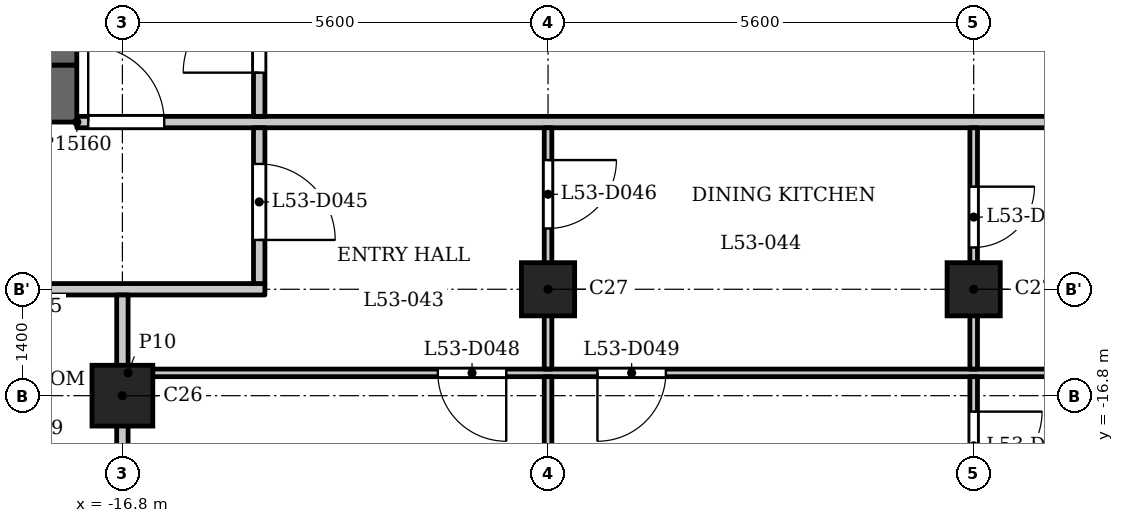
"""IFC4 building model, lengths in metres.
Left out: names, types, materials, properties, quantities, classifications, styles, units other than length and angle.
Written with IfcOpenShell. Run it as: python <this file> out.ifc"""

import sys

from ifc_helpers import new_model, si_unit, direction, frame, frame_2d, origin, origin_2d, place, context, subcontext, project, spatial, rectangle, extrude, element, fill, save


model = new_model("IFC4")
c1 = context("Model", 3, precision=1e-05, world=origin(), true_north=direction((0.0, 1.0)))
c2 = subcontext(c1, "Body", "Model", "MODEL_VIEW")
j1 = project(units=[si_unit("LENGTHUNIT", "METRE"), si_unit("PLANEANGLEUNIT", "RADIAN")], contexts=[c1])
p1 = place(None, origin())
s1 = spatial("IfcSite", under=j1, at=p1, CompositionType="ELEMENT")
p2 = place(p1, origin())
s2 = spatial("IfcBuilding", under=s1, at=p2, CompositionType="ELEMENT")
p3 = place(p2, frame((0.0, 0.0, 206.4)))
s3 = spatial("IfcBuildingStorey", under=s2, at=p3, CompositionType="ELEMENT", Elevation=206.4)
p4 = place(p3, frame((-16.8, -16.8, 0.0), z_axis=(0.0, 0.0, 1.0), x_axis=(1.0, 0.0, 0.0)))
e1 = element("IfcColumn", 1, at=p4, inside=s3, PredefinedType="COLUMN", context=c2, shape_type="SweptSolid", body=[
    extrude(rectangle(XDim=0.8, YDim=0.8, at=origin_2d()), origin(), (0.0, 0.0, 1.0), 3.5),
])
for number, where, z_axis, x_axis in (
    (2, (-11.2, -15.4, 0.0), (0.0, 0.0, 1.0), (1.0, 0.0, 0.0)),
    (3, (-5.6, -15.4, 0.0), (0.0, 0.0, 1.0), (1.0, 0.0, 0.0)),
):
    element("IfcColumn", number, at=place(p3, frame(where, z_axis=z_axis, x_axis=x_axis)), inside=s3, PredefinedType="COLUMN", context=c2, shape_type="SweptSolid", body=[
        extrude(rectangle(XDim=0.7, YDim=0.7, at=origin_2d()), origin(), (0.0, 0.0, 1.0), 3.5),
    ])
p5 = place(p3, frame((-17.4, -12.825, 0.0), z_axis=(0.0, 0.0, 1.0), x_axis=(-1.0, 0.0, 0.0)))
e4 = element("IfcWall", 4, at=p5, inside=s3, PredefinedType="SHEAR", context=c2, shape_type="SweptSolid", body=[
    extrude(rectangle(XDim=7.6, YDim=0.75, at=frame_2d((3.8, 0.0))), origin(), (0.0, 0.0, 1.0), 3.2),
])
p6 = place(p3, frame((-17.6, -12.45, 0.0), z_axis=(0.0, 0.0, 1.0), x_axis=(0.0, 1.0, 0.0)))
e5 = element("IfcWall", 5, at=p6, inside=s3, PredefinedType="SHEAR", context=c2, shape_type="SweptSolid", body=[
    extrude(rectangle(XDim=24.9, YDim=0.4, at=frame_2d((12.45, 0.0))), origin(), (0.0, 0.0, 1.0), 3.2),
])
p7 = place(p6, frame((8.65, 0.0, 0.0)))
e6 = element("IfcOpeningElement", 6, at=p7, cuts=e5, PredefinedType="OPENING", context=c2, shape_type="SweptSolid", body=[
    extrude(rectangle(XDim=0.9, YDim=2.1, at=frame_2d((0.45, 1.05))), frame((0.0, 0.21, 0.0), z_axis=(0.0, -1.0, 0.0), x_axis=(1.0, 0.0, 0.0)), (0.0, 0.0, 1.0), 0.42),
])
p8 = place(p6, frame((15.6, 0.0, 0.0)))
e7 = element("IfcOpeningElement", 7, at=p8, cuts=e5, PredefinedType="OPENING", context=c2, shape_type="SweptSolid", body=[
    extrude(rectangle(XDim=1.1, YDim=2.1, at=frame_2d((0.55, 1.05))), frame((0.0, 0.21, 0.0), z_axis=(0.0, -1.0, 0.0), x_axis=(1.0, 0.0, 0.0)), (0.0, 0.0, 1.0), 0.42),
])
p9 = place(p6, frame((18.0, 0.0, 0.0)))
e8 = element("IfcOpeningElement", 8, at=p9, cuts=e5, PredefinedType="OPENING", context=c2, shape_type="SweptSolid", body=[
    extrude(rectangle(XDim=1.1, YDim=2.1, at=frame_2d((0.55, 1.05))), frame((0.0, 0.21, 0.0), z_axis=(0.0, -1.0, 0.0), x_axis=(1.0, 0.0, 0.0)), (0.0, 0.0, 1.0), 0.42),
])
p10 = place(p6, frame((23.025, 0.0, 0.0)))
e9 = element("IfcOpeningElement", 9, at=p10, cuts=e5, PredefinedType="OPENING", context=c2, shape_type="SweptSolid", body=[
    extrude(rectangle(XDim=1.1, YDim=2.1, at=frame_2d((0.55, 1.05))), frame((0.0, 0.21, 0.0), z_axis=(0.0, -1.0, 0.0), x_axis=(1.0, 0.0, 0.0)), (0.0, 0.0, 1.0), 0.42),
])
p11 = place(p6, frame((0.775, 0.0, 0.0)))
e10 = element("IfcOpeningElement", 10, at=p11, cuts=e5, PredefinedType="OPENING", context=c2, shape_type="SweptSolid", body=[
    extrude(rectangle(XDim=1.1, YDim=2.1, at=frame_2d((0.55, 1.05))), frame((0.0, 0.21, 0.0), z_axis=(0.0, -1.0, 0.0), x_axis=(1.0, 0.0, 0.0)), (0.0, 0.0, 1.0), 0.42),
])
p12 = place(p6, frame((12.925, 0.0, 0.0)))
e11 = element("IfcOpeningElement", 11, at=p12, cuts=e5, PredefinedType="OPENING", context=c2, shape_type="SweptSolid", body=[
    extrude(rectangle(XDim=1.8, YDim=2.1, at=frame_2d((0.9, 1.05))), frame((0.0, 0.21, 0.0), z_axis=(0.0, -1.0, 0.0), x_axis=(1.0, 0.0, 0.0)), (0.0, 0.0, 1.0), 0.42),
])
p13 = place(p3, frame((-16.725, -16.5, 0.0), z_axis=(0.0, 0.0, 1.0), x_axis=(1.0, 0.0, 0.0)))
e12 = element("IfcWall", 12, at=p13, inside=s3, PredefinedType="PARTITIONING", context=c2, shape_type="SweptSolid", body=[
    extrude(rectangle(XDim=33.45, YDim=0.1, at=frame_2d((16.725, 0.0))), origin(), (0.0, 0.0, 1.0), 3.2),
])
p14 = place(p13, frame((4.075, 0.0, 0.0)))
e13 = element("IfcOpeningElement", 13, at=p14, cuts=e12, PredefinedType="OPENING", context=c2, shape_type="SweptSolid", body=[
    extrude(rectangle(XDim=0.9, YDim=2.1, at=frame_2d((0.45, 1.05))), frame((0.0, 0.06, 0.0), z_axis=(0.0, -1.0, 0.0), x_axis=(1.0, 0.0, 0.0)), (0.0, 0.0, 1.0), 0.12),
])
p15 = place(p13, frame((6.175, 0.0, 0.0)))
e14 = element("IfcOpeningElement", 14, at=p15, cuts=e12, PredefinedType="OPENING", context=c2, shape_type="SweptSolid", body=[
    extrude(rectangle(XDim=0.9, YDim=2.1, at=frame_2d((0.45, 1.05))), frame((0.0, 0.06, 0.0), z_axis=(0.0, -1.0, 0.0), x_axis=(1.0, 0.0, 0.0)), (0.0, 0.0, 1.0), 0.12),
])
p16 = place(p13, frame((30.575, 0.0, 0.0)))
e15 = element("IfcOpeningElement", 15, at=p16, cuts=e12, PredefinedType="OPENING", context=c2, shape_type="SweptSolid", body=[
    extrude(rectangle(XDim=0.9, YDim=2.1, at=frame_2d((0.45, 1.05))), frame((0.0, 0.06, 0.0), z_axis=(0.0, -1.0, 0.0), x_axis=(1.0, 0.0, 0.0)), (0.0, 0.0, 1.0), 0.12),
])
p17 = place(p13, frame((22.975, 0.0, 0.0)))
e16 = element("IfcOpeningElement", 16, at=p17, cuts=e12, PredefinedType="OPENING", context=c2, shape_type="SweptSolid", body=[
    extrude(rectangle(XDim=0.9, YDim=2.1, at=frame_2d((0.45, 1.05))), frame((0.0, 0.06, 0.0), z_axis=(0.0, -1.0, 0.0), x_axis=(1.0, 0.0, 0.0)), (0.0, 0.0, 1.0), 0.12),
])
p18 = place(p3, frame((-24.684, -15.4, 0.0), z_axis=(0.0, 0.0, 1.0), x_axis=(1.0, 0.0, 0.0)))
e17 = element("IfcWall", 17, at=p18, inside=s3, PredefinedType="PARTITIONING", context=c2, shape_type="SweptSolid", body=[
    extrude(rectangle(XDim=9.759, YDim=0.15, at=frame_2d((4.879, 0.0))), origin(), (0.0, 0.0, 1.0), 3.2),
])
p19 = place(p18, frame((3.643, 0.0, 0.0)))
e18 = element("IfcOpeningElement", 18, at=p19, cuts=e17, PredefinedType="OPENING", context=c2, shape_type="SweptSolid", body=[
    extrude(rectangle(XDim=1.0, YDim=2.1, at=frame_2d((0.5, 1.05))), frame((0.0, 0.085, 0.0), z_axis=(0.0, -1.0, 0.0), x_axis=(1.0, 0.0, 0.0)), (0.0, 0.0, 1.0), 0.17),
])
p20 = place(p3, frame((-17.4, -13.2, 0.0), z_axis=(0.0, 0.0, 1.0), x_axis=(1.0, 0.0, 0.0)))
e19 = element("IfcWall", 19, at=p20, inside=s3, PredefinedType="PARTITIONING", context=c2, shape_type="SweptSolid", body=[
    extrude(rectangle(XDim=34.8, YDim=0.15, at=frame_2d((17.4, 0.0))), origin(), (0.0, 0.0, 1.0), 3.2),
])
p21 = place(p20, frame((0.15, 0.0, 0.0)))
e20 = element("IfcOpeningElement", 20, at=p21, cuts=e19, PredefinedType="OPENING", context=c2, shape_type="SweptSolid", body=[
    extrude(rectangle(XDim=1.0, YDim=2.1, at=frame_2d((0.5, 1.05))), frame((0.0, 0.085, 0.0), z_axis=(0.0, -1.0, 0.0), x_axis=(1.0, 0.0, 0.0)), (0.0, 0.0, 1.0), 0.17),
])
p22 = place(p20, frame((33.55, 0.0, 0.0)))
e21 = element("IfcOpeningElement", 21, at=p22, cuts=e19, PredefinedType="OPENING", context=c2, shape_type="SweptSolid", body=[
    extrude(rectangle(XDim=1.0, YDim=2.1, at=frame_2d((0.5, 1.05))), frame((0.0, 0.085, 0.0), z_axis=(0.0, -1.0, 0.0), x_axis=(1.0, 0.0, 0.0)), (0.0, 0.0, 1.0), 0.17),
])
p23 = place(p3, frame((-16.8, -22.31, 0.0), z_axis=(0.0, 0.0, 1.0), x_axis=(0.0, 1.0, 0.0)))
e22 = element("IfcWall", 22, at=p23, inside=s3, PredefinedType="PARTITIONING", context=c2, shape_type="SweptSolid", body=[
    extrude(rectangle(XDim=6.835, YDim=0.15, at=frame_2d((3.417, 0.0))), origin(), (0.0, 0.0, 1.0), 2.55),
])
p24 = place(p3, frame((-15.0, -15.325, 0.0), z_axis=(0.0, 0.0, 1.0), x_axis=(0.0, 1.0, 0.0)))
e23 = element("IfcWall", 23, at=p24, inside=s3, PredefinedType="PARTITIONING", context=c2, shape_type="SweptSolid", body=[
    extrude(rectangle(XDim=2.05, YDim=0.15, at=frame_2d((1.025, 0.0))), origin(), (0.0, 0.0, 1.0), 3.2),
])
p25 = place(p24, frame((0.574, 0.0, 0.0)))
e24 = element("IfcOpeningElement", 24, at=p25, cuts=e23, PredefinedType="OPENING", context=c2, shape_type="SweptSolid", body=[
    extrude(rectangle(XDim=1.0, YDim=2.1, at=frame_2d((0.5, 1.05))), frame((0.0, 0.085, 0.0), z_axis=(0.0, -1.0, 0.0), x_axis=(1.0, 0.0, 0.0)), (0.0, 0.0, 1.0), 0.17),
])
p26 = place(p3, frame((-15.0, -13.125, 0.0), z_axis=(0.0, 0.0, 1.0), x_axis=(0.0, 1.0, 0.0)))
e25 = element("IfcWall", 25, at=p26, inside=s3, PredefinedType="PARTITIONING", context=c2, shape_type="SweptSolid", body=[
    extrude(rectangle(XDim=6.356, YDim=0.15, at=frame_2d((3.178, 0.0))), origin(), (0.0, 0.0, 1.0), 3.2),
])
p27 = place(p26, frame((0.575, 0.0, 0.0)))
e26 = element("IfcOpeningElement", 26, at=p27, cuts=e25, PredefinedType="OPENING", context=c2, shape_type="SweptSolid", body=[
    extrude(rectangle(XDim=1.0, YDim=2.1, at=frame_2d((0.5, 1.05))), frame((0.0, 0.085, 0.0), z_axis=(0.0, -1.0, 0.0), x_axis=(1.0, 0.0, 0.0)), (0.0, 0.0, 1.0), 0.17),
])
p28 = place(p3, frame((-11.2, -22.08, 0.0), z_axis=(0.0, 0.0, 1.0), x_axis=(0.0, 1.0, 0.0)))
e27 = element("IfcWall", 27, at=p28, inside=s3, PredefinedType="PARTITIONING", context=c2, shape_type="SweptSolid", body=[
    extrude(rectangle(XDim=5.53, YDim=0.1, at=frame_2d((2.765, 0.0))), origin(), (0.0, 0.0, 1.0), 3.2),
])
p29 = place(p3, frame((-11.2, -16.45, 0.0), z_axis=(0.0, 0.0, 1.0), x_axis=(0.0, 1.0, 0.0)))
e28 = element("IfcWall", 28, at=p29, inside=s3, PredefinedType="PARTITIONING", context=c2, shape_type="SweptSolid", body=[
    extrude(rectangle(XDim=3.175, YDim=0.1, at=frame_2d((1.587, 0.0))), origin(), (0.0, 0.0, 1.0), 3.2),
])
p30 = place(p29, frame((1.85, 0.0, 0.0)))
e29 = element("IfcOpeningElement", 29, at=p30, cuts=e28, PredefinedType="OPENING", context=c2, shape_type="SweptSolid", body=[
    extrude(rectangle(XDim=0.9, YDim=2.1, at=frame_2d((0.45, 1.05))), frame((0.0, 0.06, 0.0), z_axis=(0.0, -1.0, 0.0), x_axis=(1.0, 0.0, 0.0)), (0.0, 0.0, 1.0), 0.12),
])
p31 = place(p3, frame((-5.6, -22.08, 0.0), z_axis=(0.0, 0.0, 1.0), x_axis=(0.0, 1.0, 0.0)))
e30 = element("IfcWall", 30, at=p31, inside=s3, PredefinedType="PARTITIONING", context=c2, shape_type="SweptSolid", body=[
    extrude(rectangle(XDim=5.53, YDim=0.1, at=frame_2d((2.765, 0.0))), origin(), (0.0, 0.0, 1.0), 3.2),
])
p32 = place(p31, frame((4.17, 0.0, 0.0)))
e31 = element("IfcOpeningElement", 31, at=p32, cuts=e30, PredefinedType="OPENING", context=c2, shape_type="SweptSolid", body=[
    extrude(rectangle(XDim=0.9, YDim=2.1, at=frame_2d((0.45, 1.05))), frame((0.0, 0.06, 0.0), z_axis=(0.0, -1.0, 0.0), x_axis=(1.0, 0.0, 0.0)), (0.0, 0.0, 1.0), 0.12),
])
p33 = place(p3, frame((-5.6, -16.45, 0.0), z_axis=(0.0, 0.0, 1.0), x_axis=(0.0, 1.0, 0.0)))
e32 = element("IfcWall", 32, at=p33, inside=s3, PredefinedType="PARTITIONING", context=c2, shape_type="SweptSolid", body=[
    extrude(rectangle(XDim=3.175, YDim=0.1, at=frame_2d((1.587, 0.0))), origin(), (0.0, 0.0, 1.0), 3.2),
])
p34 = place(p33, frame((1.6, 0.0, 0.0)))
e33 = element("IfcOpeningElement", 33, at=p34, cuts=e32, PredefinedType="OPENING", context=c2, shape_type="SweptSolid", body=[
    extrude(rectangle(XDim=0.8, YDim=2.1, at=frame_2d((0.4, 1.05))), frame((0.0, 0.06, 0.0), z_axis=(0.0, -1.0, 0.0), x_axis=(1.0, 0.0, 0.0)), (0.0, 0.0, 1.0), 0.12),
])
p35 = place(p27, origin())
e34 = element("IfcDoor", 34, at=p35, inside=s3, OperationType="SINGLE_SWING_RIGHT", PredefinedType="DOOR", context=c2, shape_type="SweptSolid", body=[
    extrude(rectangle(XDim=1.0, YDim=2.1, at=frame_2d((0.5, 1.05))), frame((0.0, 0.025, 0.0), z_axis=(0.0, -1.0, 0.0), x_axis=(1.0, 0.0, 0.0)), (0.0, 0.0, 1.0), 0.05),
])
fill(e26, e34)
p36 = place(p21, origin())
e35 = element("IfcDoor", 35, at=p36, inside=s3, OperationType="SINGLE_SWING_RIGHT", PredefinedType="DOOR", context=c2, shape_type="SweptSolid", body=[
    extrude(rectangle(XDim=1.0, YDim=2.1, at=frame_2d((0.5, 1.05))), frame((0.0, 0.025, 0.0), z_axis=(0.0, -1.0, 0.0), x_axis=(1.0, 0.0, 0.0)), (0.0, 0.0, 1.0), 0.05),
])
fill(e20, e35)
p37 = place(p25, origin())
e36 = element("IfcDoor", 36, at=p37, inside=s3, OperationType="SINGLE_SWING_LEFT", PredefinedType="DOOR", context=c2, shape_type="SweptSolid", body=[
    extrude(rectangle(XDim=1.0, YDim=2.1, at=frame_2d((0.5, 1.05))), frame((0.0, 0.025, 0.0), z_axis=(0.0, -1.0, 0.0), x_axis=(1.0, 0.0, 0.0)), (0.0, 0.0, 1.0), 0.05),
])
fill(e24, e36)
p38 = place(p30, origin())
e37 = element("IfcDoor", 37, at=p38, inside=s3, OperationType="SINGLE_SWING_RIGHT", PredefinedType="DOOR", context=c2, shape_type="SweptSolid", body=[
    extrude(rectangle(XDim=0.9, YDim=2.1, at=frame_2d((0.45, 1.05))), frame((0.0, 0.025, 0.0), z_axis=(0.0, -1.0, 0.0), x_axis=(1.0, 0.0, 0.0)), (0.0, 0.0, 1.0), 0.05),
])
fill(e29, e37)
p39 = place(p34, origin())
e38 = element("IfcDoor", 38, at=p39, inside=s3, OperationType="SINGLE_SWING_RIGHT", PredefinedType="DOOR", context=c2, shape_type="SweptSolid", body=[
    extrude(rectangle(XDim=0.8, YDim=2.1, at=frame_2d((0.4, 1.05))), frame((0.0, 0.025, 0.0), z_axis=(0.0, -1.0, 0.0), x_axis=(1.0, 0.0, 0.0)), (0.0, 0.0, 1.0), 0.05),
])
fill(e33, e38)
p40 = place(p14, origin())
e39 = element("IfcDoor", 39, at=p40, inside=s3, OperationType="SINGLE_SWING_RIGHT", PredefinedType="DOOR", context=c2, shape_type="SweptSolid", body=[
    extrude(rectangle(XDim=0.9, YDim=2.1, at=frame_2d((0.45, 1.05))), frame((0.0, 0.025, 0.0), z_axis=(0.0, -1.0, 0.0), x_axis=(1.0, 0.0, 0.0)), (0.0, 0.0, 1.0), 0.05),
])
fill(e13, e39)
p41 = place(p15, origin())
e40 = element("IfcDoor", 40, at=p41, inside=s3, OperationType="SINGLE_SWING_LEFT", PredefinedType="DOOR", context=c2, shape_type="SweptSolid", body=[
    extrude(rectangle(XDim=0.9, YDim=2.1, at=frame_2d((0.45, 1.05))), frame((0.0, 0.025, 0.0), z_axis=(0.0, -1.0, 0.0), x_axis=(1.0, 0.0, 0.0)), (0.0, 0.0, 1.0), 0.05),
])
fill(e14, e40)
p42 = place(p32, origin())
e41 = element("IfcDoor", 41, at=p42, inside=s3, OperationType="SINGLE_SWING_RIGHT", PredefinedType="DOOR", context=c2, shape_type="SweptSolid", body=[
    extrude(rectangle(XDim=0.9, YDim=2.1, at=frame_2d((0.45, 1.05))), frame((0.0, 0.025, 0.0), z_axis=(0.0, -1.0, 0.0), x_axis=(1.0, 0.0, 0.0)), (0.0, 0.0, 1.0), 0.05),
])
fill(e31, e41)
save(model, sys.argv[1])
